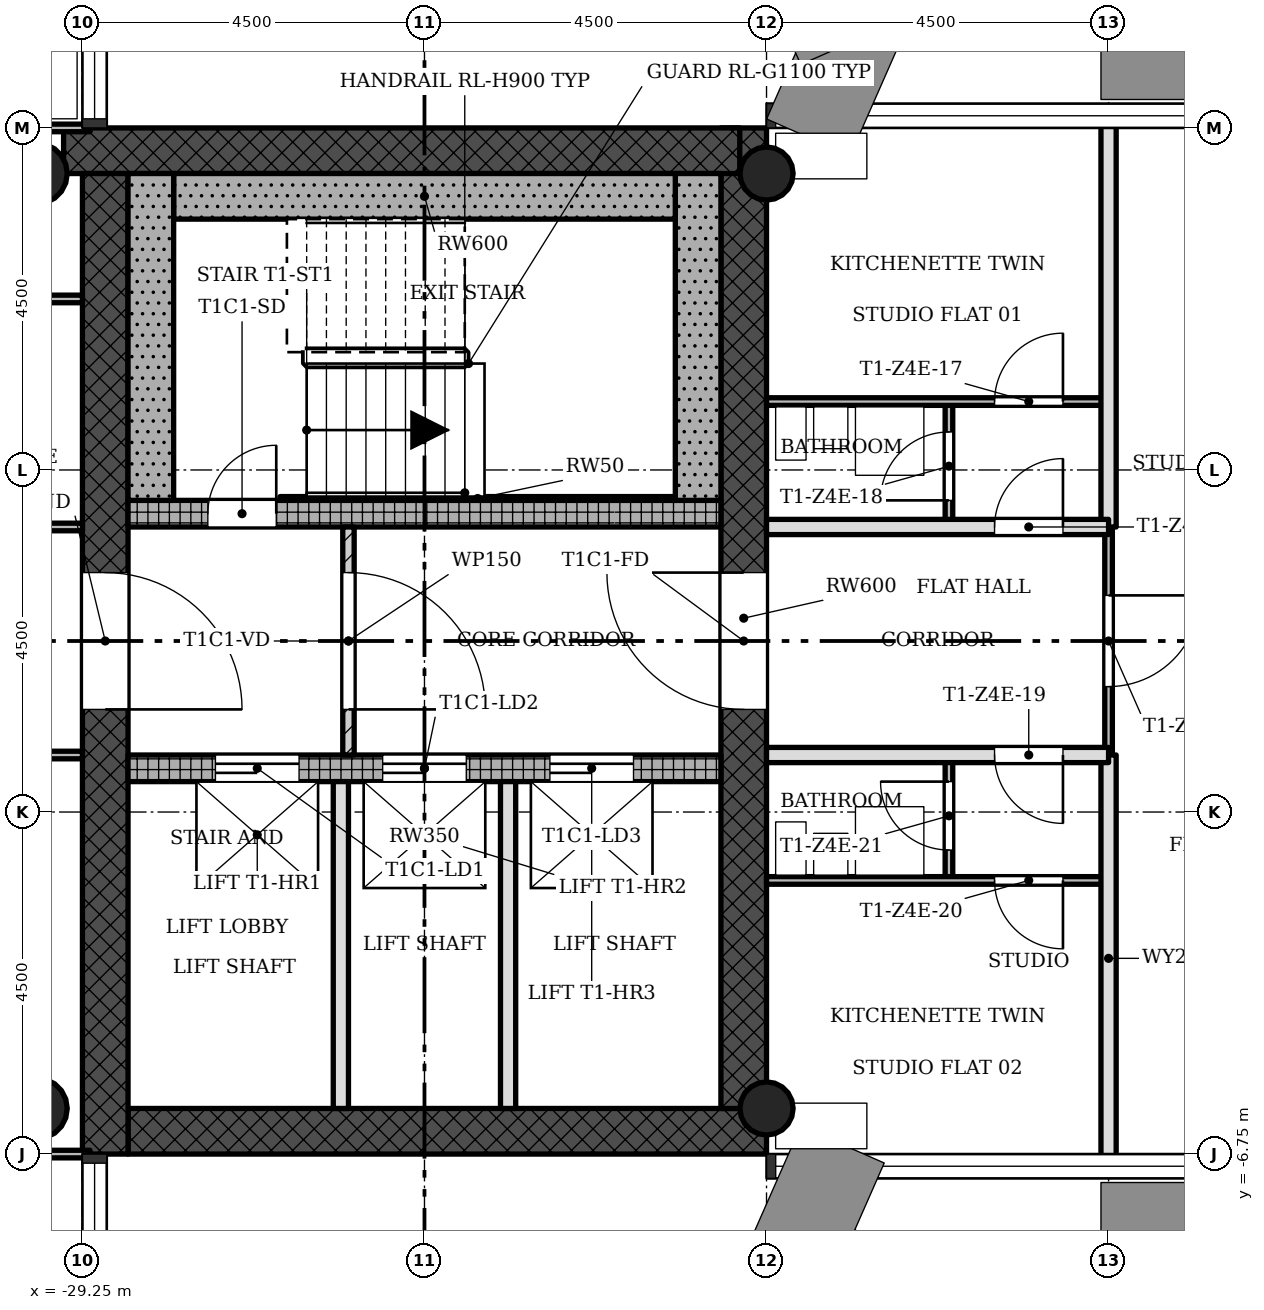
"""IFC4 building model, lengths in metres.
Left out: names, types, materials, properties, quantities, classifications, styles, units other than length and angle.
Written with IfcOpenShell. Run it as: python <this file> out.ifc"""

import sys

from ifc_helpers import new_model, si_unit, direction, frame, frame_2d, origin, origin_2d, place, context, subcontext, project, spatial, rectangle, hollow_circle, extrude, element, fill, save


model = new_model("IFC4")
c1 = context("Model", 3, precision=1e-05, world=origin(), true_north=direction((0.0, 1.0)))
c2 = subcontext(c1, "Body", "Model", "MODEL_VIEW")
j1 = project(units=[si_unit("LENGTHUNIT", "METRE"), si_unit("PLANEANGLEUNIT", "RADIAN")], contexts=[c1])
p1 = place(None, origin())
s1 = spatial("IfcSite", under=j1, at=p1, CompositionType="ELEMENT")
p2 = place(p1, origin())
s2 = spatial("IfcBuilding", under=s1, at=p2, CompositionType="ELEMENT")
p3 = place(p2, frame((0.0, 0.0, 209.6)))
s3 = spatial("IfcBuildingStorey", under=s2, at=p3, CompositionType="ELEMENT", Elevation=209.6)
p4 = place(p3, frame((-28.65, -6.45, 0.0), z_axis=(0.0, 0.0, 1.0), x_axis=(1.0, 0.0, 0.0)))
e1 = element("IfcWall", 1, at=p4, inside=s3, PredefinedType="SHEAR", context=c2, shape_type="SweptSolid", body=[
    extrude(rectangle(XDim=8.4, YDim=0.6, at=frame_2d((4.2, 0.0))), origin(), (0.0, 0.0, 1.0), 3.4),
])
p5 = place(p3, frame((-20.55, -6.15, 0.0), z_axis=(0.0, 0.0, 1.0), x_axis=(0.0, 1.0, 0.0)))
e2 = element("IfcWall", 2, at=p5, inside=s3, PredefinedType="SHEAR", context=c2, shape_type="SweptSolid", body=[
    extrude(rectangle(XDim=12.9, YDim=0.6, at=frame_2d((6.45, 0.0))), origin(), (0.0, 0.0, 1.0), 3.4),
])
p6 = place(p5, frame((5.25, 0.0, 0.0)))
e3 = element("IfcOpeningElement", 3, at=p6, cuts=e2, PredefinedType="OPENING", context=c2, shape_type="SweptSolid", body=[
    extrude(rectangle(XDim=1.8, YDim=2.1, at=frame_2d((0.9, 1.05))), frame((0.0, 0.31, 0.0), z_axis=(0.0, -1.0, 0.0), x_axis=(1.0, 0.0, 0.0)), (0.0, 0.0, 1.0), 0.62),
])
p7 = place(p3, frame((-20.602, 6.45, 0.0), z_axis=(0.0, 0.0, 1.0), x_axis=(-1.0, 0.0, 0.0)))
e4 = element("IfcWall", 4, at=p7, inside=s3, PredefinedType="SHEAR", context=c2, shape_type="SweptSolid", body=[
    extrude(rectangle(XDim=8.896, YDim=0.6, at=frame_2d((4.448, 0.0))), origin(), (0.0, 0.0, 1.0), 3.4),
])
p8 = place(p3, frame((-28.95, 6.15, 0.0), z_axis=(0.0, 0.0, 1.0), x_axis=(0.0, -1.0, 0.0)))
e5 = element("IfcWall", 5, at=p8, inside=s3, PredefinedType="SHEAR", context=c2, shape_type="SweptSolid", body=[
    extrude(rectangle(XDim=12.9, YDim=0.6, at=frame_2d((6.45, 0.0))), origin(), (0.0, 0.0, 1.0), 3.4),
])
p9 = place(p8, frame((5.25, 0.0, 0.0)))
e6 = element("IfcOpeningElement", 6, at=p9, cuts=e5, PredefinedType="OPENING", context=c2, shape_type="SweptSolid", body=[
    extrude(rectangle(XDim=1.8, YDim=2.1, at=frame_2d((0.9, 1.05))), frame((0.0, 0.31, 0.0), z_axis=(0.0, -1.0, 0.0), x_axis=(1.0, 0.0, 0.0)), (0.0, 0.0, 1.0), 0.62),
])
p10 = place(p3, frame((-28.65, -1.675, 0.0), z_axis=(0.0, 0.0, 1.0), x_axis=(1.0, 0.0, 0.0)))
e7 = element("IfcWall", 7, at=p10, inside=s3, PredefinedType="SHEAR", context=c2, shape_type="SweptSolid", body=[
    extrude(rectangle(XDim=7.8, YDim=0.35, at=frame_2d((3.9, 0.0))), origin(), (0.0, 0.0, 1.0), 3.4),
])
p11 = place(p10, frame((1.15, 0.0, 0.0)))
e8 = element("IfcOpeningElement", 8, at=p11, cuts=e7, PredefinedType="OPENING", context=c2, shape_type="SweptSolid", body=[
    extrude(rectangle(XDim=1.1, YDim=2.1, at=frame_2d((0.55, 1.05))), frame((0.0, 0.185, 0.0), z_axis=(0.0, -1.0, 0.0), x_axis=(1.0, 0.0, 0.0)), (0.0, 0.0, 1.0), 0.37),
])
p12 = place(p10, frame((3.35, 0.0, 0.0)))
e9 = element("IfcOpeningElement", 9, at=p12, cuts=e7, PredefinedType="OPENING", context=c2, shape_type="SweptSolid", body=[
    extrude(rectangle(XDim=1.1, YDim=2.1, at=frame_2d((0.55, 1.05))), frame((0.0, 0.185, 0.0), z_axis=(0.0, -1.0, 0.0), x_axis=(1.0, 0.0, 0.0)), (0.0, 0.0, 1.0), 0.37),
])
p13 = place(p10, frame((5.55, 0.0, 0.0)))
e10 = element("IfcOpeningElement", 10, at=p13, cuts=e7, PredefinedType="OPENING", context=c2, shape_type="SweptSolid", body=[
    extrude(rectangle(XDim=1.1, YDim=2.1, at=frame_2d((0.55, 1.05))), frame((0.0, 0.185, 0.0), z_axis=(0.0, -1.0, 0.0), x_axis=(1.0, 0.0, 0.0)), (0.0, 0.0, 1.0), 0.37),
])
p14 = place(p3, frame((-28.65, 1.675, 0.0), z_axis=(0.0, 0.0, 1.0), x_axis=(1.0, 0.0, 0.0)))
e11 = element("IfcWall", 11, at=p14, inside=s3, PredefinedType="SHEAR", context=c2, shape_type="SweptSolid", body=[
    extrude(rectangle(XDim=7.8, YDim=0.35, at=frame_2d((3.9, 0.0))), origin(), (0.0, 0.0, 1.0), 3.4),
])
p15 = place(p14, frame((1.05, 0.0, 0.0)))
e12 = element("IfcOpeningElement", 12, at=p15, cuts=e11, PredefinedType="OPENING", context=c2, shape_type="SweptSolid", body=[
    extrude(rectangle(XDim=0.9, YDim=2.1, at=frame_2d((0.45, 1.05))), frame((0.0, 0.185, 0.0), z_axis=(0.0, -1.0, 0.0), x_axis=(1.0, 0.0, 0.0)), (0.0, 0.0, 1.0), 0.37),
])
for number, where, z_axis, x_axis in (
    (13, (-20.25, -6.15, 0.0), (0.0, 0.0, 1.0), (1.0, 0.0, 0.0)),
    (14, (-20.25, 6.15, 0.0), (0.0, 0.0, 1.0), (1.0, 0.0, 0.0)),
):
    element("IfcColumn", number, at=place(p3, frame(where, z_axis=z_axis, x_axis=x_axis)), inside=s3, PredefinedType="COLUMN", context=c2, shape_type="SweptSolid", body=[
        extrude(hollow_circle(Radius=0.35, WallThickness=0.025, at=origin_2d()), origin(), (0.0, 0.0, 1.0), 3.4),
    ])
for number, where, z_axis, x_axis in (
    (15, (-29.85, -6.15, 0.0), (0.0, 0.0, 1.0), (1.0, 0.0, 0.0)),
    (16, (-29.85, 6.15, 0.0), (0.0, 0.0, 1.0), (1.0, 0.0, 0.0)),
):
    element("IfcColumn", number, at=place(p3, frame(where, z_axis=z_axis, x_axis=x_axis)), inside=s3, PredefinedType="COLUMN", context=c2, shape_type="SweptSolid", body=[
        extrude(hollow_circle(Radius=0.4, WallThickness=0.028, at=origin_2d()), origin(), (0.0, 0.0, 1.0), 3.4),
    ])
p16 = place(p3, frame((-25.75, -1.5, 0.0), z_axis=(0.0, 0.0, 1.0), x_axis=(0.0, 1.0, 0.0)))
e17 = element("IfcWall", 17, at=p16, inside=s3, PredefinedType="PARTITIONING", context=c2, shape_type="SweptSolid", body=[
    extrude(rectangle(XDim=3.0, YDim=0.15, at=frame_2d((1.5, 0.0))), origin(), (0.0, 0.0, 1.0), 3.0),
])
p17 = place(p16, frame((0.6, 0.0, 0.0)))
e18 = element("IfcOpeningElement", 18, at=p17, cuts=e17, PredefinedType="OPENING", context=c2, shape_type="SweptSolid", body=[
    extrude(rectangle(XDim=1.8, YDim=2.1, at=frame_2d((0.9, 1.05))), frame((0.0, 0.085, 0.0), z_axis=(0.0, -1.0, 0.0), x_axis=(1.0, 0.0, 0.0)), (0.0, 0.0, 1.0), 0.17),
])
for number, where, z_axis, x_axis in (
    (19, (-25.85, -6.15, 0.0), (0.0, 0.0, 1.0), (0.0, 1.0, 0.0)),
    (20, (-23.65, -6.15, 0.0), (0.0, 0.0, 1.0), (0.0, 1.0, 0.0)),
):
    element("IfcWall", number, at=place(p3, frame(where, z_axis=z_axis, x_axis=x_axis)), inside=s3, PredefinedType="SOLIDWALL", context=c2, shape_type="SweptSolid", body=[
        extrude(rectangle(XDim=4.3, YDim=0.2, at=frame_2d((2.15, 0.0))), origin(), (0.0, 0.0, 1.0), 3.0),
    ])
p18 = place(p3, frame((-17.85, -3.15, 0.0), z_axis=(0.0, 0.0, 1.0), x_axis=(0.0, 1.0, 0.0)))
e21 = element("IfcWall", 21, at=p18, inside=s3, PredefinedType="PARTITIONING", context=c2, shape_type="SweptSolid", body=[
    extrude(rectangle(XDim=1.65, YDim=0.1, at=frame_2d((0.825, 0.0))), origin(), (0.0, 0.0, 1.0), 3.0),
])
p19 = place(p18, frame((0.4, 0.0, 0.0)))
e22 = element("IfcOpeningElement", 22, at=p19, cuts=e21, PredefinedType="OPENING", context=c2, shape_type="SweptSolid", body=[
    extrude(rectangle(XDim=0.9, YDim=2.1, at=frame_2d((0.45, 1.05))), frame((0.0, 0.06, 0.0), z_axis=(0.0, -1.0, 0.0), x_axis=(1.0, 0.0, 0.0)), (0.0, 0.0, 1.0), 0.12),
])
p20 = place(p3, frame((-17.85, 1.5, 0.0), z_axis=(0.0, 0.0, 1.0), x_axis=(0.0, 1.0, 0.0)))
e23 = element("IfcWall", 23, at=p20, inside=s3, PredefinedType="PARTITIONING", context=c2, shape_type="SweptSolid", body=[
    extrude(rectangle(XDim=1.65, YDim=0.1, at=frame_2d((0.825, 0.0))), origin(), (0.0, 0.0, 1.0), 3.0),
])
p21 = place(p20, frame((0.35, 0.0, 0.0)))
e24 = element("IfcOpeningElement", 24, at=p21, cuts=e23, PredefinedType="OPENING", context=c2, shape_type="SweptSolid", body=[
    extrude(rectangle(XDim=0.9, YDim=2.1, at=frame_2d((0.45, 1.05))), frame((0.0, 0.06, 0.0), z_axis=(0.0, -1.0, 0.0), x_axis=(1.0, 0.0, 0.0)), (0.0, 0.0, 1.0), 0.12),
])
p22 = place(p3, frame((-15.75, -1.5, 0.0), z_axis=(0.0, 0.0, 1.0), x_axis=(0.0, 1.0, 0.0)))
e25 = element("IfcWall", 25, at=p22, inside=s3, PredefinedType="PARTITIONING", context=c2, shape_type="SweptSolid", body=[
    extrude(rectangle(XDim=3.0, YDim=0.1, at=frame_2d((1.5, 0.0))), origin(), (0.0, 0.0, 1.0), 3.0),
])
p23 = place(p22, frame((0.9, 0.0, 0.0)))
e26 = element("IfcOpeningElement", 26, at=p23, cuts=e25, PredefinedType="OPENING", context=c2, shape_type="SweptSolid", body=[
    extrude(rectangle(XDim=1.2, YDim=2.1, at=frame_2d((0.6, 1.05))), frame((0.0, 0.06, 0.0), z_axis=(0.0, -1.0, 0.0), x_axis=(1.0, 0.0, 0.0)), (0.0, 0.0, 1.0), 0.12),
])
for number, where, z_axis, x_axis in (
    (27, (-15.75, -6.85, 0.0), (0.0, 0.0, 1.0), (0.0, 1.0, 0.0)),
    (28, (-15.75, 1.5, 0.0), (0.0, 0.0, 1.0), (0.0, 1.0, 0.0)),
):
    element("IfcWall", number, at=place(p3, frame(where, z_axis=z_axis, x_axis=x_axis)), inside=s3, PredefinedType="SOLIDWALL", context=c2, shape_type="SweptSolid", body=[
        extrude(rectangle(XDim=5.35, YDim=0.2, at=frame_2d((2.675, 0.0))), origin(), (0.0, 0.0, 1.0), 3.0),
    ])
p24 = place(p3, frame((-35.1, -6.75, 0.0), z_axis=(0.0, 0.0, 1.0), x_axis=(1.0, 0.0, 0.0)))
e29 = element("IfcWall", 29, at=p24, inside=s3, PredefinedType="PARTITIONING", context=c2, shape_type="SweptSolid", body=[
    extrude(rectangle(XDim=5.95, YDim=0.1, at=frame_2d((2.975, 0.0))), origin(), (0.0, 0.0, 1.0), 3.0),
])
p25 = place(p3, frame((-20.25, -3.15, 0.0), z_axis=(0.0, 0.0, 1.0), x_axis=(1.0, 0.0, 0.0)))
e30 = element("IfcWall", 30, at=p25, inside=s3, PredefinedType="PARTITIONING", context=c2, shape_type="SweptSolid", body=[
    extrude(rectangle(XDim=4.5, YDim=0.1, at=frame_2d((2.25, 0.0))), origin(), (0.0, 0.0, 1.0), 3.0),
])
p26 = place(p25, frame((3.0, 0.0, 0.0)))
e31 = element("IfcOpeningElement", 31, at=p26, cuts=e30, PredefinedType="OPENING", context=c2, shape_type="SweptSolid", body=[
    extrude(rectangle(XDim=0.9, YDim=2.1, at=frame_2d((0.45, 1.05))), frame((0.0, 0.06, 0.0), z_axis=(0.0, -1.0, 0.0), x_axis=(1.0, 0.0, 0.0)), (0.0, 0.0, 1.0), 0.12),
])
p27 = place(p3, frame((-31.5, -1.5, 0.0), z_axis=(0.0, 0.0, 1.0), x_axis=(1.0, 0.0, 0.0)))
e32 = element("IfcWall", 32, at=p27, inside=s3, PredefinedType="PARTITIONING", context=c2, shape_type="SweptSolid", body=[
    extrude(rectangle(XDim=2.25, YDim=0.1, at=frame_2d((1.125, 0.0))), origin(), (0.0, 0.0, 1.0), 3.0),
])
p28 = place(p3, frame((-20.25, -1.5, 0.0), z_axis=(0.0, 0.0, 1.0), x_axis=(1.0, 0.0, 0.0)))
e33 = element("IfcWall", 33, at=p28, inside=s3, PredefinedType="SOLIDWALL", context=c2, shape_type="SweptSolid", body=[
    extrude(rectangle(XDim=4.5, YDim=0.2, at=frame_2d((2.25, 0.0))), origin(), (0.0, 0.0, 1.0), 3.0),
])
p29 = place(p28, frame((3.0, 0.0, 0.0)))
e34 = element("IfcOpeningElement", 34, at=p29, cuts=e33, PredefinedType="OPENING", context=c2, shape_type="SweptSolid", body=[
    extrude(rectangle(XDim=0.9, YDim=2.1, at=frame_2d((0.45, 1.05))), frame((0.0, 0.11, 0.0), z_axis=(0.0, -1.0, 0.0), x_axis=(1.0, 0.0, 0.0)), (0.0, 0.0, 1.0), 0.22),
])
p30 = place(p3, frame((-31.5, 1.5, 0.0), z_axis=(0.0, 0.0, 1.0), x_axis=(1.0, 0.0, 0.0)))
e35 = element("IfcWall", 35, at=p30, inside=s3, PredefinedType="PARTITIONING", context=c2, shape_type="SweptSolid", body=[
    extrude(rectangle(XDim=2.25, YDim=0.1, at=frame_2d((1.125, 0.0))), origin(), (0.0, 0.0, 1.0), 3.0),
])
p31 = place(p3, frame((-20.25, 1.5, 0.0), z_axis=(0.0, 0.0, 1.0), x_axis=(1.0, 0.0, 0.0)))
e36 = element("IfcWall", 36, at=p31, inside=s3, PredefinedType="SOLIDWALL", context=c2, shape_type="SweptSolid", body=[
    extrude(rectangle(XDim=4.5, YDim=0.2, at=frame_2d((2.25, 0.0))), origin(), (0.0, 0.0, 1.0), 3.0),
])
p32 = place(p31, frame((3.0, 0.0, 0.0)))
e37 = element("IfcOpeningElement", 37, at=p32, cuts=e36, PredefinedType="OPENING", context=c2, shape_type="SweptSolid", body=[
    extrude(rectangle(XDim=0.9, YDim=2.1, at=frame_2d((0.45, 1.05))), frame((0.0, 0.11, 0.0), z_axis=(0.0, -1.0, 0.0), x_axis=(1.0, 0.0, 0.0)), (0.0, 0.0, 1.0), 0.22),
])
p33 = place(p3, frame((-20.25, 3.15, 0.0), z_axis=(0.0, 0.0, 1.0), x_axis=(1.0, 0.0, 0.0)))
e38 = element("IfcWall", 38, at=p33, inside=s3, PredefinedType="PARTITIONING", context=c2, shape_type="SweptSolid", body=[
    extrude(rectangle(XDim=4.5, YDim=0.1, at=frame_2d((2.25, 0.0))), origin(), (0.0, 0.0, 1.0), 3.0),
])
p34 = place(p33, frame((3.0, 0.0, 0.0)))
e39 = element("IfcOpeningElement", 39, at=p34, cuts=e38, PredefinedType="OPENING", context=c2, shape_type="SweptSolid", body=[
    extrude(rectangle(XDim=0.9, YDim=2.1, at=frame_2d((0.45, 1.05))), frame((0.0, 0.06, 0.0), z_axis=(0.0, -1.0, 0.0), x_axis=(1.0, 0.0, 0.0)), (0.0, 0.0, 1.0), 0.12),
])
p35 = place(p3, frame((-35.1, 4.5, 0.0), z_axis=(0.0, 0.0, 1.0), x_axis=(1.0, 0.0, 0.0)))
e40 = element("IfcWall", 40, at=p35, inside=s3, PredefinedType="PARTITIONING", context=c2, shape_type="SweptSolid", body=[
    extrude(rectangle(XDim=5.85, YDim=0.1, at=frame_2d((2.925, 0.0))), origin(), (0.0, 0.0, 1.0), 3.0),
])
p36 = place(p35, frame((1.35, 0.0, 0.0)))
e41 = element("IfcOpeningElement", 41, at=p36, cuts=e40, PredefinedType="OPENING", context=c2, shape_type="SweptSolid", body=[
    extrude(rectangle(XDim=0.9, YDim=2.1, at=frame_2d((0.45, 1.05))), frame((0.0, 0.06, 0.0), z_axis=(0.0, -1.0, 0.0), x_axis=(1.0, 0.0, 0.0)), (0.0, 0.0, 1.0), 0.12),
])
p37 = place(p3, frame((-35.1, 6.75, 0.0), z_axis=(0.0, 0.0, 1.0), x_axis=(1.0, 0.0, 0.0)))
e42 = element("IfcWall", 42, at=p37, inside=s3, PredefinedType="PARTITIONING", context=c2, shape_type="SweptSolid", body=[
    extrude(rectangle(XDim=5.95, YDim=0.1, at=frame_2d((2.975, 0.0))), origin(), (0.0, 0.0, 1.0), 3.0),
])
p38 = place(p3, frame((-21.15, 1.85, 0.0), z_axis=(0.0, 0.0, 1.0), x_axis=(0.0, 1.0, 0.0)))
e43 = element("IfcWall", 43, at=p38, inside=s3, PredefinedType="SHEAR", context=c2, shape_type="SweptSolid", body=[
    extrude(rectangle(XDim=4.3, YDim=0.6, at=frame_2d((2.15, 0.0))), origin(), (0.0, 0.0, 1.0), 3.4),
])
p39 = place(p3, frame((-28.05, 5.85, 0.0), z_axis=(0.0, 0.0, 1.0), x_axis=(1.0, 0.0, 0.0)))
e44 = element("IfcWall", 44, at=p39, inside=s3, PredefinedType="SHEAR", context=c2, shape_type="SweptSolid", body=[
    extrude(rectangle(XDim=6.6, YDim=0.6, at=frame_2d((3.3, 0.0))), origin(), (0.0, 0.0, 1.0), 3.4),
])
p40 = place(p3, frame((-28.35, 1.85, 0.0), z_axis=(0.0, 0.0, 1.0), x_axis=(0.0, 1.0, 0.0)))
e45 = element("IfcWall", 45, at=p40, inside=s3, PredefinedType="SHEAR", context=c2, shape_type="SweptSolid", body=[
    extrude(rectangle(XDim=4.3, YDim=0.6, at=frame_2d((2.15, 0.0))), origin(), (0.0, 0.0, 1.0), 3.4),
])
p41 = place(p3, frame((-26.65, 1.875, 0.0), z_axis=(0.0, 0.0, 1.0), x_axis=(1.0, 0.0, 0.0)))
e46 = element("IfcWall", 46, at=p41, inside=s3, PredefinedType="SHEAR", context=c2, shape_type="SweptSolid", body=[
    extrude(rectangle(XDim=5.2, YDim=0.05, at=frame_2d((2.6, 0.0))), origin(), (0.0, 0.0, 1.0), 3.4),
])
p42 = place(p17, origin())
e47 = element("IfcDoor", 47, at=p42, inside=s3, OperationType="SINGLE_SWING_LEFT", PredefinedType="DOOR", context=c2, shape_type="SweptSolid", body=[
    extrude(rectangle(XDim=1.8, YDim=2.1, at=frame_2d((0.9, 1.05))), frame((0.0, 0.025, 0.0), z_axis=(0.0, -1.0, 0.0), x_axis=(1.0, 0.0, 0.0)), (0.0, 0.0, 1.0), 0.05),
])
fill(e18, e47)
p43 = place(p32, origin())
e48 = element("IfcDoor", 48, at=p43, inside=s3, OperationType="SINGLE_SWING_LEFT", PredefinedType="DOOR", context=c2, shape_type="SweptSolid", body=[
    extrude(rectangle(XDim=0.9, YDim=2.1, at=frame_2d((0.45, 1.05))), frame((0.0, 0.025, 0.0), z_axis=(0.0, -1.0, 0.0), x_axis=(1.0, 0.0, 0.0)), (0.0, 0.0, 1.0), 0.05),
])
fill(e37, e48)
p44 = place(p34, origin())
e49 = element("IfcDoor", 49, at=p44, inside=s3, OperationType="SINGLE_SWING_LEFT", PredefinedType="DOOR", context=c2, shape_type="SweptSolid", body=[
    extrude(rectangle(XDim=0.9, YDim=2.1, at=frame_2d((0.45, 1.05))), frame((0.0, 0.025, 0.0), z_axis=(0.0, -1.0, 0.0), x_axis=(1.0, 0.0, 0.0)), (0.0, 0.0, 1.0), 0.05),
])
fill(e39, e49)
p45 = place(p21, origin())
e50 = element("IfcDoor", 50, at=p45, inside=s3, OperationType="SINGLE_SWING_RIGHT", PredefinedType="DOOR", context=c2, shape_type="SweptSolid", body=[
    extrude(rectangle(XDim=0.9, YDim=2.1, at=frame_2d((0.45, 1.05))), frame((0.0, 0.025, 0.0), z_axis=(0.0, -1.0, 0.0), x_axis=(1.0, 0.0, 0.0)), (0.0, 0.0, 1.0), 0.05),
])
fill(e24, e50)
p46 = place(p29, origin())
e51 = element("IfcDoor", 51, at=p46, inside=s3, OperationType="SINGLE_SWING_RIGHT", PredefinedType="DOOR", context=c2, shape_type="SweptSolid", body=[
    extrude(rectangle(XDim=0.9, YDim=2.1, at=frame_2d((0.45, 1.05))), frame((0.0, 0.025, 0.0), z_axis=(0.0, -1.0, 0.0), x_axis=(1.0, 0.0, 0.0)), (0.0, 0.0, 1.0), 0.05),
])
fill(e34, e51)
p47 = place(p26, origin())
e52 = element("IfcDoor", 52, at=p47, inside=s3, OperationType="SINGLE_SWING_RIGHT", PredefinedType="DOOR", context=c2, shape_type="SweptSolid", body=[
    extrude(rectangle(XDim=0.9, YDim=2.1, at=frame_2d((0.45, 1.05))), frame((0.0, 0.025, 0.0), z_axis=(0.0, -1.0, 0.0), x_axis=(1.0, 0.0, 0.0)), (0.0, 0.0, 1.0), 0.05),
])
fill(e31, e52)
p48 = place(p19, origin())
e53 = element("IfcDoor", 53, at=p48, inside=s3, OperationType="SINGLE_SWING_LEFT", PredefinedType="DOOR", context=c2, shape_type="SweptSolid", body=[
    extrude(rectangle(XDim=0.9, YDim=2.1, at=frame_2d((0.45, 1.05))), frame((0.0, 0.025, 0.0), z_axis=(0.0, -1.0, 0.0), x_axis=(1.0, 0.0, 0.0)), (0.0, 0.0, 1.0), 0.05),
])
fill(e22, e53)
p49 = place(p23, origin())
e54 = element("IfcDoor", 54, at=p49, inside=s3, OperationType="SINGLE_SWING_RIGHT", PredefinedType="DOOR", context=c2, shape_type="SweptSolid", body=[
    extrude(rectangle(XDim=1.2, YDim=2.1, at=frame_2d((0.6, 1.05))), frame((0.0, 0.025, 0.0), z_axis=(0.0, -1.0, 0.0), x_axis=(1.0, 0.0, 0.0)), (0.0, 0.0, 1.0), 0.05),
])
fill(e26, e54)
p50 = place(p15, origin())
e55 = element("IfcDoor", 55, at=p50, inside=s3, OperationType="SINGLE_SWING_LEFT", PredefinedType="DOOR", context=c2, shape_type="SweptSolid", body=[
    extrude(rectangle(XDim=0.9, YDim=2.1, at=frame_2d((0.45, 1.05))), frame((0.0, 0.025, 0.0), z_axis=(0.0, -1.0, 0.0), x_axis=(1.0, 0.0, 0.0)), (0.0, 0.0, 1.0), 0.05),
])
fill(e12, e55)
p51 = place(p11, origin())
e56 = element("IfcDoor", 56, at=p51, inside=s3, OperationType="SLIDING_TO_LEFT", PredefinedType="DOOR", context=c2, shape_type="SweptSolid", body=[
    extrude(rectangle(XDim=1.1, YDim=2.1, at=frame_2d((0.55, 1.05))), frame((0.0, 0.025, 0.0), z_axis=(0.0, -1.0, 0.0), x_axis=(1.0, 0.0, 0.0)), (0.0, 0.0, 1.0), 0.05),
])
fill(e8, e56)
p52 = place(p12, origin())
e57 = element("IfcDoor", 57, at=p52, inside=s3, OperationType="SLIDING_TO_LEFT", PredefinedType="DOOR", context=c2, shape_type="SweptSolid", body=[
    extrude(rectangle(XDim=1.1, YDim=2.1, at=frame_2d((0.55, 1.05))), frame((0.0, 0.025, 0.0), z_axis=(0.0, -1.0, 0.0), x_axis=(1.0, 0.0, 0.0)), (0.0, 0.0, 1.0), 0.05),
])
fill(e9, e57)
p53 = place(p13, origin())
e58 = element("IfcDoor", 58, at=p53, inside=s3, OperationType="SLIDING_TO_LEFT", PredefinedType="DOOR", context=c2, shape_type="SweptSolid", body=[
    extrude(rectangle(XDim=1.1, YDim=2.1, at=frame_2d((0.55, 1.05))), frame((0.0, 0.025, 0.0), z_axis=(0.0, -1.0, 0.0), x_axis=(1.0, 0.0, 0.0)), (0.0, 0.0, 1.0), 0.05),
])
fill(e10, e58)
p54 = place(p9, origin())
e59 = element("IfcDoor", 59, at=p54, inside=s3, OperationType="SINGLE_SWING_LEFT", PredefinedType="DOOR", context=c2, shape_type="SweptSolid", body=[
    extrude(rectangle(XDim=1.8, YDim=2.1, at=frame_2d((0.9, 1.05))), frame((0.0, 0.025, 0.0), z_axis=(0.0, -1.0, 0.0), x_axis=(1.0, 0.0, 0.0)), (0.0, 0.0, 1.0), 0.05),
])
fill(e6, e59)
p55 = place(p6, origin())
e60 = element("IfcDoor", 60, at=p55, inside=s3, OperationType="SINGLE_SWING_LEFT", PredefinedType="DOOR", context=c2, shape_type="SweptSolid", body=[
    extrude(rectangle(XDim=1.8, YDim=2.1, at=frame_2d((0.9, 1.05))), frame((0.0, 0.025, 0.0), z_axis=(0.0, -1.0, 0.0), x_axis=(1.0, 0.0, 0.0)), (0.0, 0.0, 1.0), 0.05),
])
fill(e3, e60)
save(model, sys.argv[1])
